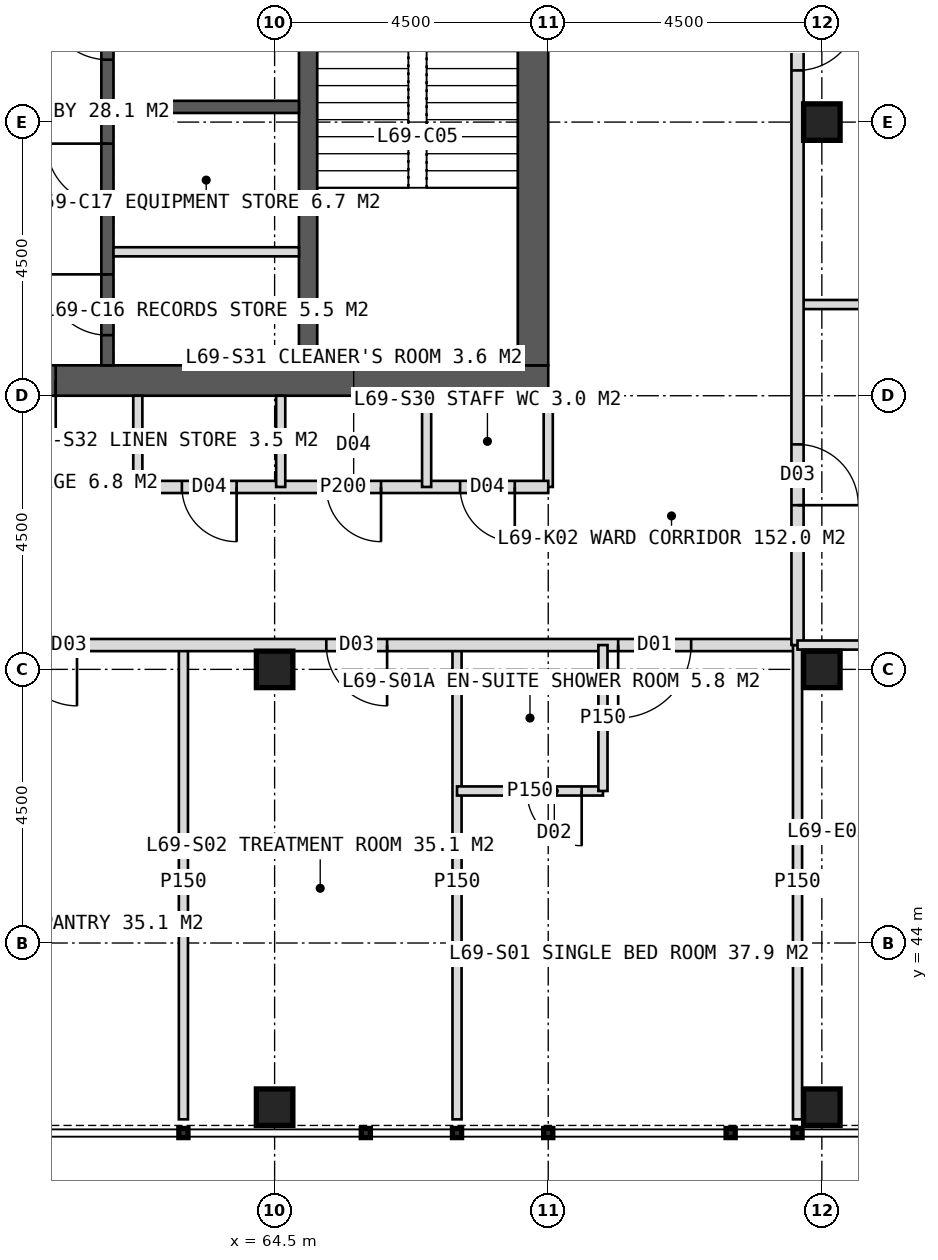
"""IFC4 building model, lengths in metres.
Left out: names, types, materials, properties, quantities, classifications, styles, units other than length and angle.
Written with IfcOpenShell. Run it as: python <this file> out.ifc"""

import sys

from ifc_helpers import new_model, si_unit, direction, frame, frame_2d, origin, origin_2d, place, context, subcontext, project, spatial, rectangle, hollow_rectangle, extrude, element, fill, save


model = new_model("IFC4")
c1 = context("Model", 3, precision=1e-05, world=origin(), true_north=direction((0.0, 1.0)))
c2 = subcontext(c1, "Body", "Model", "MODEL_VIEW")
j1 = project(units=[si_unit("LENGTHUNIT", "METRE"), si_unit("PLANEANGLEUNIT", "RADIAN")], contexts=[c1])
p1 = place(None, origin())
s1 = spatial("IfcSite", under=j1, at=p1, CompositionType="ELEMENT")
p2 = place(p1, origin())
s2 = spatial("IfcBuilding", under=s1, at=p2, CompositionType="ELEMENT")
p3 = place(p2, frame((0.0, 0.0, 286.0)))
s3 = spatial("IfcBuildingStorey", under=s2, at=p3, CompositionType="ELEMENT", Elevation=286.0)
p4 = place(p3, frame((51.0, 53.25, 0.0), z_axis=(0.0, 0.0, 1.0), x_axis=(1.0, 0.0, 0.0)))
e1 = element("IfcWall", 1, at=p4, inside=s3, PredefinedType="SHEAR", context=c2, shape_type="SweptSolid", body=[
    extrude(rectangle(XDim=18.0, YDim=0.5, at=frame_2d((9.0, 0.0))), origin(), (0.0, 0.0, 1.0), 4.0),
])
p5 = place(p4, frame((8.1, 0.0, 0.0)))
e2 = element("IfcOpeningElement", 2, at=p5, cuts=e1, PredefinedType="OPENING", context=c2, shape_type="SweptSolid", body=[
    extrude(rectangle(XDim=1.8, YDim=2.2, at=frame_2d((0.9, 1.1))), frame((0.0, 0.26, 0.0), z_axis=(0.0, -1.0, 0.0), x_axis=(1.0, 0.0, 0.0)), (0.0, 0.0, 1.0), 0.52),
])
p6 = place(p3, frame((68.75, 53.5, 0.0), z_axis=(0.0, 0.0, 1.0), x_axis=(0.0, 1.0, 0.0)))
e3 = element("IfcWall", 3, at=p6, inside=s3, PredefinedType="SHEAR", context=c2, shape_type="SweptSolid", body=[
    extrude(rectangle(XDim=17.0, YDim=0.5, at=frame_2d((8.5, 0.0))), origin(), (0.0, 0.0, 1.0), 4.0),
])
p7 = place(p6, frame((9.6, 0.0, 0.0)))
e4 = element("IfcOpeningElement", 4, at=p7, cuts=e3, PredefinedType="OPENING", context=c2, shape_type="SweptSolid", body=[
    extrude(rectangle(XDim=1.5, YDim=2.2, at=frame_2d((0.75, 1.1))), frame((0.0, 0.26, 0.0), z_axis=(0.0, -1.0, 0.0), x_axis=(1.0, 0.0, 0.0)), (0.0, 0.0, 1.0), 0.52),
])
p8 = place(p3, frame((65.05, 53.5, 0.0), z_axis=(0.0, 0.0, 1.0), x_axis=(0.0, 1.0, 0.0)))
e5 = element("IfcWall", 5, at=p8, inside=s3, PredefinedType="SHEAR", context=c2, shape_type="SweptSolid", body=[
    extrude(rectangle(XDim=17.0, YDim=0.3, at=frame_2d((8.5, 0.0))), origin(), (0.0, 0.0, 1.0), 4.0),
])
p9 = place(p3, frame((61.75, 53.5, 0.0), z_axis=(0.0, 0.0, 1.0), x_axis=(0.0, 1.0, 0.0)))
e6 = element("IfcWall", 6, at=p9, inside=s3, PredefinedType="SHEAR", context=c2, shape_type="SweptSolid", body=[
    extrude(rectangle(XDim=17.0, YDim=0.2, at=frame_2d((8.5, 0.0))), origin(), (0.0, 0.0, 1.0), 4.0),
])
p10 = place(p9, frame((0.496, 0.0, 0.0)))
e7 = element("IfcOpeningElement", 7, at=p10, cuts=e6, PredefinedType="OPENING", context=c2, shape_type="SweptSolid", body=[
    extrude(rectangle(XDim=1.0, YDim=2.1, at=frame_2d((0.5, 1.05))), frame((0.0, 0.11, 0.0), z_axis=(0.0, -1.0, 0.0), x_axis=(1.0, 0.0, 0.0)), (0.0, 0.0, 1.0), 0.22),
])
p11 = place(p9, frame((2.646, 0.0, 0.0)))
e8 = element("IfcOpeningElement", 8, at=p11, cuts=e6, PredefinedType="OPENING", context=c2, shape_type="SweptSolid", body=[
    extrude(rectangle(XDim=1.0, YDim=2.1, at=frame_2d((0.5, 1.05))), frame((0.0, 0.11, 0.0), z_axis=(0.0, -1.0, 0.0), x_axis=(1.0, 0.0, 0.0)), (0.0, 0.0, 1.0), 0.22),
])
p12 = place(p9, frame((5.027, 0.0, 0.0)))
e9 = element("IfcOpeningElement", 9, at=p12, cuts=e6, PredefinedType="OPENING", context=c2, shape_type="SweptSolid", body=[
    extrude(rectangle(XDim=1.0, YDim=2.1, at=frame_2d((0.5, 1.05))), frame((0.0, 0.11, 0.0), z_axis=(0.0, -1.0, 0.0), x_axis=(1.0, 0.0, 0.0)), (0.0, 0.0, 1.0), 0.22),
])
p13 = place(p9, frame((7.126, 0.0, 0.0)))
e10 = element("IfcOpeningElement", 10, at=p13, cuts=e6, PredefinedType="OPENING", context=c2, shape_type="SweptSolid", body=[
    extrude(rectangle(XDim=1.0, YDim=2.1, at=frame_2d((0.5, 1.05))), frame((0.0, 0.11, 0.0), z_axis=(0.0, -1.0, 0.0), x_axis=(1.0, 0.0, 0.0)), (0.0, 0.0, 1.0), 0.22),
])
p14 = place(p9, frame((10.025, 0.0, 0.0)))
e11 = element("IfcOpeningElement", 11, at=p14, cuts=e6, PredefinedType="OPENING", context=c2, shape_type="SweptSolid", body=[
    extrude(rectangle(XDim=1.4, YDim=2.2, at=frame_2d((0.7, 1.1))), frame((0.0, 0.11, 0.0), z_axis=(0.0, -1.0, 0.0), x_axis=(1.0, 0.0, 0.0)), (0.0, 0.0, 1.0), 0.22),
])
p15 = place(p9, frame((14.325, 0.0, 0.0)))
e12 = element("IfcOpeningElement", 12, at=p15, cuts=e6, PredefinedType="OPENING", context=c2, shape_type="SweptSolid", body=[
    extrude(rectangle(XDim=1.4, YDim=2.2, at=frame_2d((0.7, 1.1))), frame((0.0, 0.11, 0.0), z_axis=(0.0, -1.0, 0.0), x_axis=(1.0, 0.0, 0.0)), (0.0, 0.0, 1.0), 0.22),
])
p16 = place(p3, frame((61.85, 57.75, 0.0), z_axis=(0.0, 0.0, 1.0), x_axis=(1.0, 0.0, 0.0)))
e13 = element("IfcWall", 13, at=p16, inside=s3, PredefinedType="SHEAR", context=c2, shape_type="SweptSolid", body=[
    extrude(rectangle(XDim=3.05, YDim=0.2, at=frame_2d((1.525, 0.0))), origin(), (0.0, 0.0, 1.0), 4.0),
])
for number, where, z_axis, x_axis in (
    (14, (73.5, 48.5, 0.0), (0.0, 0.0, 1.0), (1.0, 0.0, 0.0)),
    (15, (64.5, 48.5, 0.0), (0.0, 0.0, 1.0), (1.0, 0.0, 0.0)),
    (16, (73.5, 57.5, 0.0), (0.0, 0.0, 1.0), (1.0, 0.0, 0.0)),
    (17, (64.5, 41.3, 0.0), (0.0, 0.0, 1.0), (1.0, 0.0, 0.0)),
    (18, (73.5, 41.3, 0.0), (0.0, 0.0, 1.0), (1.0, 0.0, 0.0)),
):
    element("IfcColumn", number, at=place(p3, frame(where, z_axis=z_axis, x_axis=x_axis)), inside=s3, PredefinedType="COLUMN", context=c2, shape_type="SweptSolid", body=[
        extrude(hollow_rectangle(XDim=0.6, YDim=0.6, WallThickness=0.04, at=origin_2d()), origin(), (0.0, 0.0, 1.0), 4.0),
    ])
for number, where, z_axis, x_axis in (
    (19, (67.5, 48.9, 0.0), (0.0, 0.0, 1.0), (0.0, -1.0, 0.0)),
    (20, (63.0, 48.9, 0.0), (0.0, 0.0, 1.0), (0.0, -1.0, 0.0)),
):
    element("IfcWall", number, at=place(p3, frame(where, z_axis=z_axis, x_axis=x_axis)), inside=s3, PredefinedType="PARTITIONING", context=c2, shape_type="SweptSolid", body=[
        extrude(rectangle(XDim=7.8, YDim=0.15, at=frame_2d((3.9, 0.0))), origin(), (0.0, 0.0, 1.0), 3.75),
    ])
p17 = place(p3, frame((73.1, 48.9, 0.0), z_axis=(0.0, 0.0, 1.0), x_axis=(-1.0, 0.0, 0.0)))
e21 = element("IfcWall", 21, at=p17, inside=s3, PredefinedType="PARTITIONING", context=c2, shape_type="SweptSolid", body=[
    extrude(rectangle(XDim=26.2, YDim=0.2, at=frame_2d((13.1, 0.0))), origin(), (0.0, 0.0, 1.0), 3.75),
])
p18 = place(p17, frame((1.75, 0.0, 0.0)))
e22 = element("IfcOpeningElement", 22, at=p18, cuts=e21, PredefinedType="OPENING", context=c2, shape_type="SweptSolid", body=[
    extrude(rectangle(XDim=1.2, YDim=2.2, at=frame_2d((0.6, 1.1))), frame((0.0, 0.11, 0.0), z_axis=(0.0, -1.0, 0.0), x_axis=(1.0, 0.0, 0.0)), (0.0, 0.0, 1.0), 0.22),
])
p19 = place(p17, frame((6.75, 0.0, 0.0)))
e23 = element("IfcOpeningElement", 23, at=p19, cuts=e21, PredefinedType="OPENING", context=c2, shape_type="SweptSolid", body=[
    extrude(rectangle(XDim=1.0, YDim=2.1, at=frame_2d((0.5, 1.05))), frame((0.0, 0.11, 0.0), z_axis=(0.0, -1.0, 0.0), x_axis=(1.0, 0.0, 0.0)), (0.0, 0.0, 1.0), 0.22),
])
p20 = place(p17, frame((11.85, 0.0, 0.0)))
e24 = element("IfcOpeningElement", 24, at=p20, cuts=e21, PredefinedType="OPENING", context=c2, shape_type="SweptSolid", body=[
    extrude(rectangle(XDim=1.0, YDim=2.1, at=frame_2d((0.5, 1.05))), frame((0.0, 0.11, 0.0), z_axis=(0.0, -1.0, 0.0), x_axis=(1.0, 0.0, 0.0)), (0.0, 0.0, 1.0), 0.22),
])
p21 = place(p17, frame((15.75, 0.0, 0.0)))
e25 = element("IfcOpeningElement", 25, at=p21, cuts=e21, PredefinedType="OPENING", context=c2, shape_type="SweptSolid", body=[
    extrude(rectangle(XDim=1.0, YDim=2.1, at=frame_2d((0.5, 1.05))), frame((0.0, 0.11, 0.0), z_axis=(0.0, -1.0, 0.0), x_axis=(1.0, 0.0, 0.0)), (0.0, 0.0, 1.0), 0.22),
])
p22 = place(p17, frame((23.25, 0.0, 0.0)))
e26 = element("IfcOpeningElement", 26, at=p22, cuts=e21, PredefinedType="OPENING", context=c2, shape_type="SweptSolid", body=[
    extrude(rectangle(XDim=1.2, YDim=2.2, at=frame_2d((0.6, 1.1))), frame((0.0, 0.11, 0.0), z_axis=(0.0, -1.0, 0.0), x_axis=(1.0, 0.0, 0.0)), (0.0, 0.0, 1.0), 0.22),
])
p23 = place(p3, frame((73.1, 48.9, 0.0), z_axis=(0.0, 0.0, 1.0), x_axis=(0.0, -1.0, 0.0)))
e27 = element("IfcWall", 27, at=p23, inside=s3, PredefinedType="PARTITIONING", context=c2, shape_type="SweptSolid", body=[
    extrude(rectangle(XDim=7.8, YDim=0.15, at=frame_2d((3.9, 0.0))), origin(), (0.0, 0.0, 1.0), 3.75),
])
p24 = place(p3, frame((69.9, 46.5, 0.0), z_axis=(0.0, 0.0, 1.0), x_axis=(-1.0, 0.0, 0.0)))
e28 = element("IfcWall", 28, at=p24, inside=s3, PredefinedType="PARTITIONING", context=c2, shape_type="SweptSolid", body=[
    extrude(rectangle(XDim=2.4, YDim=0.15, at=frame_2d((1.2, 0.0))), origin(), (0.0, 0.0, 1.0), 3.75),
])
p25 = place(p24, frame((0.35, 0.0, 0.0)))
e29 = element("IfcOpeningElement", 29, at=p25, cuts=e28, PredefinedType="OPENING", context=c2, shape_type="SweptSolid", body=[
    extrude(rectangle(XDim=0.9, YDim=2.1, at=frame_2d((0.45, 1.05))), frame((0.0, 0.085, 0.0), z_axis=(0.0, -1.0, 0.0), x_axis=(1.0, 0.0, 0.0)), (0.0, 0.0, 1.0), 0.17),
])
p26 = place(p3, frame((69.9, 48.9, 0.0), z_axis=(0.0, 0.0, 1.0), x_axis=(0.0, -1.0, 0.0)))
e30 = element("IfcWall", 30, at=p26, inside=s3, PredefinedType="PARTITIONING", context=c2, shape_type="SweptSolid", body=[
    extrude(rectangle(XDim=2.4, YDim=0.15, at=frame_2d((1.2, 0.0))), origin(), (0.0, 0.0, 1.0), 3.75),
])
p27 = place(p3, frame((69.0, 53.0, 0.0), z_axis=(0.0, 0.0, 1.0), x_axis=(0.0, -1.0, 0.0)))
e31 = element("IfcWall", 31, at=p27, inside=s3, PredefinedType="PARTITIONING", context=c2, shape_type="SweptSolid", body=[
    extrude(rectangle(XDim=1.5, YDim=0.15, at=frame_2d((0.75, 0.0))), origin(), (0.0, 0.0, 1.0), 3.75),
])
p28 = place(p3, frame((69.0, 51.5, 0.0), z_axis=(0.0, 0.0, 1.0), x_axis=(-1.0, 0.0, 0.0)))
e32 = element("IfcWall", 32, at=p28, inside=s3, PredefinedType="PARTITIONING", context=c2, shape_type="SweptSolid", body=[
    extrude(rectangle(XDim=6.75, YDim=0.2, at=frame_2d((3.375, 0.0))), origin(), (0.0, 0.0, 1.0), 3.75),
])
p29 = place(p28, frame((0.55, 0.0, 0.0)))
e33 = element("IfcOpeningElement", 33, at=p29, cuts=e32, PredefinedType="OPENING", context=c2, shape_type="SweptSolid", body=[
    extrude(rectangle(XDim=0.9, YDim=2.1, at=frame_2d((0.45, 1.05))), frame((0.0, 0.11, 0.0), z_axis=(0.0, -1.0, 0.0), x_axis=(1.0, 0.0, 0.0)), (0.0, 0.0, 1.0), 0.22),
])
p30 = place(p28, frame((2.75, 0.0, 0.0)))
e34 = element("IfcOpeningElement", 34, at=p30, cuts=e32, PredefinedType="OPENING", context=c2, shape_type="SweptSolid", body=[
    extrude(rectangle(XDim=0.9, YDim=2.1, at=frame_2d((0.45, 1.05))), frame((0.0, 0.11, 0.0), z_axis=(0.0, -1.0, 0.0), x_axis=(1.0, 0.0, 0.0)), (0.0, 0.0, 1.0), 0.22),
])
p31 = place(p28, frame((5.125, 0.0, 0.0)))
e35 = element("IfcOpeningElement", 35, at=p31, cuts=e32, PredefinedType="OPENING", context=c2, shape_type="SweptSolid", body=[
    extrude(rectangle(XDim=0.9, YDim=2.1, at=frame_2d((0.45, 1.05))), frame((0.0, 0.11, 0.0), z_axis=(0.0, -1.0, 0.0), x_axis=(1.0, 0.0, 0.0)), (0.0, 0.0, 1.0), 0.22),
])
for number, where, z_axis, x_axis in (
    (36, (62.25, 53.0, 0.0), (0.0, 0.0, 1.0), (0.0, -1.0, 0.0)),
    (37, (67.0, 53.0, 0.0), (0.0, 0.0, 1.0), (0.0, -1.0, 0.0)),
):
    element("IfcWall", number, at=place(p3, frame(where, z_axis=z_axis, x_axis=x_axis)), inside=s3, PredefinedType="PARTITIONING", context=c2, shape_type="SweptSolid", body=[
        extrude(rectangle(XDim=1.5, YDim=0.15, at=frame_2d((0.75, 0.0))), origin(), (0.0, 0.0, 1.0), 3.75),
    ])
p32 = place(p3, frame((64.6, 53.0, 0.0), z_axis=(0.0, 0.0, 1.0), x_axis=(0.0, -1.0, 0.0)))
e38 = element("IfcWall", 38, at=p32, inside=s3, PredefinedType="PARTITIONING", context=c2, shape_type="SweptSolid", body=[
    extrude(rectangle(XDim=1.5, YDim=0.15, at=frame_2d((0.75, 0.0))), origin(), (0.0, 0.0, 1.0), 2.95),
])
p33 = place(p3, frame((73.1, 54.5, 0.0), z_axis=(0.0, 0.0, 1.0), x_axis=(1.0, 0.0, 0.0)))
e39 = element("IfcWall", 39, at=p33, inside=s3, PredefinedType="PARTITIONING", context=c2, shape_type="SweptSolid", body=[
    extrude(rectangle(XDim=7.8, YDim=0.15, at=frame_2d((3.9, 0.0))), origin(), (0.0, 0.0, 1.0), 3.75),
])
p34 = place(p3, frame((73.1, 71.0, 0.0), z_axis=(0.0, 0.0, 1.0), x_axis=(0.0, -1.0, 0.0)))
e40 = element("IfcWall", 40, at=p34, inside=s3, PredefinedType="PARTITIONING", context=c2, shape_type="SweptSolid", body=[
    extrude(rectangle(XDim=22.1, YDim=0.2, at=frame_2d((11.05, 0.0))), origin(), (0.0, 0.0, 1.0), 3.75),
])
p35 = place(p34, frame((2.5, 0.0, 0.0)))
e41 = element("IfcOpeningElement", 41, at=p35, cuts=e40, PredefinedType="OPENING", context=c2, shape_type="SweptSolid", body=[
    extrude(rectangle(XDim=1.0, YDim=2.1, at=frame_2d((0.5, 1.05))), frame((0.0, 0.11, 0.0), z_axis=(0.0, -1.0, 0.0), x_axis=(1.0, 0.0, 0.0)), (0.0, 0.0, 1.0), 0.22),
])
p36 = place(p34, frame((7.0, 0.0, 0.0)))
e42 = element("IfcOpeningElement", 42, at=p36, cuts=e40, PredefinedType="OPENING", context=c2, shape_type="SweptSolid", body=[
    extrude(rectangle(XDim=1.0, YDim=2.1, at=frame_2d((0.5, 1.05))), frame((0.0, 0.11, 0.0), z_axis=(0.0, -1.0, 0.0), x_axis=(1.0, 0.0, 0.0)), (0.0, 0.0, 1.0), 0.22),
])
p37 = place(p34, frame((9.75, 0.0, 0.0)))
e43 = element("IfcOpeningElement", 43, at=p37, cuts=e40, PredefinedType="OPENING", context=c2, shape_type="SweptSolid", body=[
    extrude(rectangle(XDim=0.9, YDim=2.1, at=frame_2d((0.45, 1.05))), frame((0.0, 0.11, 0.0), z_axis=(0.0, -1.0, 0.0), x_axis=(1.0, 0.0, 0.0)), (0.0, 0.0, 1.0), 0.22),
])
p38 = place(p34, frame((11.65, 0.0, 0.0)))
e44 = element("IfcOpeningElement", 44, at=p38, cuts=e40, PredefinedType="OPENING", context=c2, shape_type="SweptSolid", body=[
    extrude(rectangle(XDim=1.0, YDim=2.1, at=frame_2d((0.5, 1.05))), frame((0.0, 0.11, 0.0), z_axis=(0.0, -1.0, 0.0), x_axis=(1.0, 0.0, 0.0)), (0.0, 0.0, 1.0), 0.22),
])
p39 = place(p34, frame((18.8, 0.0, 0.0)))
e45 = element("IfcOpeningElement", 45, at=p39, cuts=e40, PredefinedType="OPENING", context=c2, shape_type="SweptSolid", body=[
    extrude(rectangle(XDim=1.0, YDim=2.1, at=frame_2d((0.5, 1.05))), frame((0.0, 0.11, 0.0), z_axis=(0.0, -1.0, 0.0), x_axis=(1.0, 0.0, 0.0)), (0.0, 0.0, 1.0), 0.22),
])
p40 = place(p3, frame((73.1, 48.9, 0.0), z_axis=(0.0, 0.0, 1.0), x_axis=(1.0, 0.0, 0.0)))
e46 = element("IfcWall", 46, at=p40, inside=s3, PredefinedType="PARTITIONING", context=c2, shape_type="SweptSolid", body=[
    extrude(rectangle(XDim=7.8, YDim=0.15, at=frame_2d((3.9, 0.0))), origin(), (0.0, 0.0, 1.0), 3.75),
])
p41 = place(p40, frame((5.0, 0.0, 0.0)))
e47 = element("IfcOpeningElement", 47, at=p41, cuts=e46, PredefinedType="OPENING", context=c2, shape_type="SweptSolid", body=[
    extrude(rectangle(XDim=1.0, YDim=2.1, at=frame_2d((0.5, 1.05))), frame((0.0, 0.085, 0.0), z_axis=(0.0, -1.0, 0.0), x_axis=(1.0, 0.0, 0.0)), (0.0, 0.0, 1.0), 0.17),
])
p42 = place(p3, frame((61.85, 55.367, 0.0), z_axis=(0.0, 0.0, 1.0), x_axis=(1.0, 0.0, 0.0)))
e48 = element("IfcWall", 48, at=p42, inside=s3, PredefinedType="PARTITIONING", context=c2, shape_type="SweptSolid", body=[
    extrude(rectangle(XDim=3.05, YDim=0.15, at=frame_2d((1.525, 0.0))), origin(), (0.0, 0.0, 1.0), 3.75),
])
p43 = place(p18, origin())
e49 = element("IfcDoor", 49, at=p43, inside=s3, OperationType="SINGLE_SWING_RIGHT", PredefinedType="DOOR", context=c2, shape_type="SweptSolid", body=[
    extrude(rectangle(XDim=1.2, YDim=2.2, at=frame_2d((0.6, 1.1))), frame((0.0, 0.025, 0.0), z_axis=(0.0, -1.0, 0.0), x_axis=(1.0, 0.0, 0.0)), (0.0, 0.0, 1.0), 0.05),
])
fill(e22, e49)
p44 = place(p25, origin())
e50 = element("IfcDoor", 50, at=p44, inside=s3, OperationType="SINGLE_SWING_LEFT", PredefinedType="DOOR", context=c2, shape_type="SweptSolid", body=[
    extrude(rectangle(XDim=0.9, YDim=2.1, at=frame_2d((0.45, 1.05))), frame((0.0, 0.025, 0.0), z_axis=(0.0, -1.0, 0.0), x_axis=(1.0, 0.0, 0.0)), (0.0, 0.0, 1.0), 0.05),
])
fill(e29, e50)
p45 = place(p19, origin())
e51 = element("IfcDoor", 51, at=p45, inside=s3, OperationType="SINGLE_SWING_LEFT", PredefinedType="DOOR", context=c2, shape_type="SweptSolid", body=[
    extrude(rectangle(XDim=1.0, YDim=2.1, at=frame_2d((0.5, 1.05))), frame((0.0, 0.025, 0.0), z_axis=(0.0, -1.0, 0.0), x_axis=(1.0, 0.0, 0.0)), (0.0, 0.0, 1.0), 0.05),
])
fill(e23, e51)
p46 = place(p20, origin())
e52 = element("IfcDoor", 52, at=p46, inside=s3, OperationType="SINGLE_SWING_LEFT", PredefinedType="DOOR", context=c2, shape_type="SweptSolid", body=[
    extrude(rectangle(XDim=1.0, YDim=2.1, at=frame_2d((0.5, 1.05))), frame((0.0, 0.025, 0.0), z_axis=(0.0, -1.0, 0.0), x_axis=(1.0, 0.0, 0.0)), (0.0, 0.0, 1.0), 0.05),
])
fill(e24, e52)
p47 = place(p29, origin())
e53 = element("IfcDoor", 53, at=p47, inside=s3, OperationType="SINGLE_SWING_LEFT", PredefinedType="DOOR", context=c2, shape_type="SweptSolid", body=[
    extrude(rectangle(XDim=0.9, YDim=2.1, at=frame_2d((0.45, 1.05))), frame((0.0, 0.025, 0.0), z_axis=(0.0, -1.0, 0.0), x_axis=(1.0, 0.0, 0.0)), (0.0, 0.0, 1.0), 0.05),
])
fill(e33, e53)
p48 = place(p30, origin())
e54 = element("IfcDoor", 54, at=p48, inside=s3, OperationType="SINGLE_SWING_LEFT", PredefinedType="DOOR", context=c2, shape_type="SweptSolid", body=[
    extrude(rectangle(XDim=0.9, YDim=2.1, at=frame_2d((0.45, 1.05))), frame((0.0, 0.025, 0.0), z_axis=(0.0, -1.0, 0.0), x_axis=(1.0, 0.0, 0.0)), (0.0, 0.0, 1.0), 0.05),
])
fill(e34, e54)
p49 = place(p31, origin())
e55 = element("IfcDoor", 55, at=p49, inside=s3, OperationType="SINGLE_SWING_LEFT", PredefinedType="DOOR", context=c2, shape_type="SweptSolid", body=[
    extrude(rectangle(XDim=0.9, YDim=2.1, at=frame_2d((0.45, 1.05))), frame((0.0, 0.025, 0.0), z_axis=(0.0, -1.0, 0.0), x_axis=(1.0, 0.0, 0.0)), (0.0, 0.0, 1.0), 0.05),
])
fill(e35, e55)
p50 = place(p38, origin())
e56 = element("IfcDoor", 56, at=p50, inside=s3, OperationType="SINGLE_SWING_LEFT", PredefinedType="DOOR", context=c2, shape_type="SweptSolid", body=[
    extrude(rectangle(XDim=1.0, YDim=2.1, at=frame_2d((0.5, 1.05))), frame((0.0, 0.025, 0.0), z_axis=(0.0, -1.0, 0.0), x_axis=(1.0, 0.0, 0.0)), (0.0, 0.0, 1.0), 0.05),
])
fill(e44, e56)
p51 = place(p39, origin())
e57 = element("IfcDoor", 57, at=p51, inside=s3, OperationType="SINGLE_SWING_RIGHT", PredefinedType="DOOR", context=c2, shape_type="SweptSolid", body=[
    extrude(rectangle(XDim=1.0, YDim=2.1, at=frame_2d((0.5, 1.05))), frame((0.0, 0.025, 0.0), z_axis=(0.0, -1.0, 0.0), x_axis=(1.0, 0.0, 0.0)), (0.0, 0.0, 1.0), 0.05),
])
fill(e45, e57)
p52 = place(p10, origin())
e58 = element("IfcDoor", 58, at=p52, inside=s3, OperationType="SINGLE_SWING_RIGHT", PredefinedType="DOOR", context=c2, shape_type="SweptSolid", body=[
    extrude(rectangle(XDim=1.0, YDim=2.1, at=frame_2d((0.5, 1.05))), frame((0.0, 0.025, 0.0), z_axis=(0.0, -1.0, 0.0), x_axis=(1.0, 0.0, 0.0)), (0.0, 0.0, 1.0), 0.05),
])
fill(e7, e58)
p53 = place(p11, origin())
e59 = element("IfcDoor", 59, at=p53, inside=s3, OperationType="SINGLE_SWING_RIGHT", PredefinedType="DOOR", context=c2, shape_type="SweptSolid", body=[
    extrude(rectangle(XDim=1.0, YDim=2.1, at=frame_2d((0.5, 1.05))), frame((0.0, 0.025, 0.0), z_axis=(0.0, -1.0, 0.0), x_axis=(1.0, 0.0, 0.0)), (0.0, 0.0, 1.0), 0.05),
])
fill(e8, e59)
p54 = place(p12, origin())
e60 = element("IfcDoor", 60, at=p54, inside=s3, OperationType="SINGLE_SWING_RIGHT", PredefinedType="DOOR", context=c2, shape_type="SweptSolid", body=[
    extrude(rectangle(XDim=1.0, YDim=2.1, at=frame_2d((0.5, 1.05))), frame((0.0, 0.025, 0.0), z_axis=(0.0, -1.0, 0.0), x_axis=(1.0, 0.0, 0.0)), (0.0, 0.0, 1.0), 0.05),
])
fill(e9, e60)
p55 = place(p5, origin())
e61 = element("IfcDoor", 61, at=p55, inside=s3, OperationType="DOUBLE_DOOR_SINGLE_SWING", PredefinedType="DOOR", context=c2, shape_type="SweptSolid", body=[
    extrude(rectangle(XDim=1.8, YDim=2.2, at=frame_2d((0.9, 1.1))), frame((0.0, 0.025, 0.0), z_axis=(0.0, -1.0, 0.0), x_axis=(1.0, 0.0, 0.0)), (0.0, 0.0, 1.0), 0.05),
])
fill(e2, e61)
save(model, sys.argv[1])
